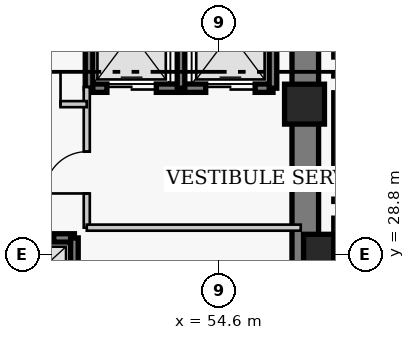
"""IFC4 building model, lengths in metres.
Left out: names, types, materials, properties, quantities, classifications, styles, units other than length and angle.
Written with IfcOpenShell. Run it as: python <this file> out.ifc"""

import sys

from ifc_helpers import new_model, si_unit, direction, frame, frame_2d, origin, origin_2d, place, context, subcontext, project, spatial, rectangle, extrude, element, fill, save


model = new_model("IFC4")
c1 = context("Model", 3, precision=1e-05, world=origin(), true_north=direction((0.0, 1.0)))
c2 = subcontext(c1, "Body", "Model", "MODEL_VIEW")
j1 = project(units=[si_unit("LENGTHUNIT", "METRE"), si_unit("PLANEANGLEUNIT", "RADIAN")], contexts=[c1])
p1 = place(None, origin())
s1 = spatial("IfcSite", under=j1, at=p1, CompositionType="ELEMENT")
p2 = place(p1, origin())
s2 = spatial("IfcBuilding", under=s1, at=p2, CompositionType="ELEMENT")
p3 = place(p2, frame((0.0, 0.0, 176.4)))
s3 = spatial("IfcBuildingStorey", under=s2, at=p3, CompositionType="ELEMENT", Elevation=176.4)
p4 = place(p3, frame((56.87, 27.05, 0.0), z_axis=(0.0, 0.0, 1.0), x_axis=(0.0, 1.0, 0.0)))
e1 = element("IfcWall", 1, at=p4, inside=s3, PredefinedType="SHEAR", context=c2, shape_type="SweptSolid", body=[
    extrude(rectangle(XDim=13.62, YDim=0.7, at=frame_2d((6.81, 0.0))), origin(), (0.0, 0.0, 1.0), 3.8),
])
for number, where, z_axis, x_axis in (
    (2, (57.35, 28.8, 0.0), (0.0, 0.0, 1.0), (1.0, 0.0, 0.0)),
    (3, (56.85, 32.75, 0.0), (0.0, 0.0, 1.0), (1.0, 0.0, 0.0)),
):
    element("IfcColumn", number, at=place(p3, frame(where, z_axis=z_axis, x_axis=x_axis)), inside=s3, PredefinedType="COLUMN", context=c2, shape_type="SweptSolid", body=[
        extrude(rectangle(XDim=1.05, YDim=1.05, at=origin_2d()), origin(), (0.0, 0.0, 1.0), 3.8),
    ])
p5 = place(p3, frame((48.55, 29.23, 0.0), z_axis=(0.0, 0.0, 1.0), x_axis=(1.0, 0.0, 0.0)))
e4 = element("IfcWall", 4, at=p5, inside=s3, PredefinedType="SHEAR", context=c2, shape_type="SweptSolid", body=[
    extrude(rectangle(XDim=2.245, YDim=0.22, at=frame_2d((1.123, 0.0))), origin(), (0.0, 0.0, 1.0), 3.8),
])
p6 = place(p5, frame((0.6, 0.0, 0.0)))
e5 = element("IfcOpeningElement", 5, at=p6, cuts=e4, PredefinedType="OPENING", context=c2, shape_type="SweptSolid", body=[
    extrude(rectangle(XDim=1.1, YDim=2.15, at=frame_2d((0.55, 1.075))), frame((0.0, 0.12, 0.0), z_axis=(0.0, -1.0, 0.0), x_axis=(1.0, 0.0, 0.0)), (0.0, 0.0, 1.0), 0.24),
])
p7 = place(p3, frame((50.795, 27.17, 0.0), z_axis=(0.0, 0.0, 1.0), x_axis=(0.0, 1.0, 0.0)))
e6 = element("IfcWall", 6, at=p7, inside=s3, PredefinedType="SHEAR", context=c2, shape_type="SweptSolid", body=[
    extrude(rectangle(XDim=2.06, YDim=0.2, at=frame_2d((1.03, 0.0))), origin(), (0.0, 0.0, 1.0), 3.8),
])
p8 = place(p3, frame((51.18, 33.17, 0.0), z_axis=(0.0, 0.0, 1.0), x_axis=(1.0, 0.0, 0.0)))
e7 = element("IfcWall", 7, at=p8, inside=s3, PredefinedType="SHEAR", context=c2, shape_type="SweptSolid", body=[
    extrude(rectangle(XDim=2.42, YDim=0.22, at=frame_2d((1.21, 0.0))), origin(), (0.0, 0.0, 1.0), 3.8),
])
p9 = place(p8, frame((0.47, 0.0, 0.0)))
e8 = element("IfcOpeningElement", 8, at=p9, cuts=e7, PredefinedType="OPENING", context=c2, shape_type="SweptSolid", body=[
    extrude(rectangle(XDim=1.3, YDim=2.15, at=frame_2d((0.65, 1.075))), frame((0.0, 0.12, 0.0), z_axis=(0.0, -1.0, 0.0), x_axis=(1.0, 0.0, 0.0)), (0.0, 0.0, 1.0), 0.24),
])
p10 = place(p3, frame((51.18, 33.17, 0.0), z_axis=(0.0, 0.0, 1.0), x_axis=(0.0, 1.0, 0.0)))
e9 = element("IfcWall", 9, at=p10, inside=s3, PredefinedType="SHEAR", context=c2, shape_type="SweptSolid", body=[
    extrude(rectangle(XDim=2.86, YDim=0.2, at=frame_2d((1.43, 0.0))), origin(), (0.0, 0.0, 1.0), 3.8),
])
p11 = place(p3, frame((53.6, 33.17, 0.0), z_axis=(0.0, 0.0, 1.0), x_axis=(1.0, 0.0, 0.0)))
e10 = element("IfcWall", 10, at=p11, inside=s3, PredefinedType="SHEAR", context=c2, shape_type="SweptSolid", body=[
    extrude(rectangle(XDim=2.42, YDim=0.22, at=frame_2d((1.21, 0.0))), origin(), (0.0, 0.0, 1.0), 3.8),
])
p12 = place(p11, frame((0.65, 0.0, 0.0)))
e11 = element("IfcOpeningElement", 11, at=p12, cuts=e10, PredefinedType="OPENING", context=c2, shape_type="SweptSolid", body=[
    extrude(rectangle(XDim=1.3, YDim=2.15, at=frame_2d((0.65, 1.075))), frame((0.0, 0.12, 0.0), z_axis=(0.0, -1.0, 0.0), x_axis=(1.0, 0.0, 0.0)), (0.0, 0.0, 1.0), 0.24),
])
for number, where, z_axis, x_axis in (
    (12, (53.6, 33.17, 0.0), (0.0, 0.0, 1.0), (0.0, 1.0, 0.0)),
    (13, (56.02, 33.17, 0.0), (0.0, 0.0, 1.0), (0.0, 1.0, 0.0)),
):
    element("IfcWall", number, at=place(p3, frame(where, z_axis=z_axis, x_axis=x_axis)), inside=s3, PredefinedType="SHEAR", context=c2, shape_type="SweptSolid", body=[
        extrude(rectangle(XDim=2.86, YDim=0.2, at=frame_2d((1.43, 0.0))), origin(), (0.0, 0.0, 1.0), 3.8),
    ])
p13 = place(p3, frame((51.12, 29.5, 0.0), z_axis=(0.0, 0.0, 1.0), x_axis=(0.0, 1.0, 0.0)))
e14 = element("IfcWall", 14, at=p13, inside=s3, PredefinedType="PARTITIONING", context=c2, shape_type="SweptSolid", body=[
    extrude(rectangle(XDim=3.7, YDim=0.16, at=frame_2d((1.85, 0.0))), origin(), (0.0, 0.0, 1.0), 3.55),
])
p14 = place(p13, frame((0.9, 0.0, 0.0)))
e15 = element("IfcOpeningElement", 15, at=p14, cuts=e14, PredefinedType="OPENING", context=c2, shape_type="SweptSolid", body=[
    extrude(rectangle(XDim=1.1, YDim=2.15, at=frame_2d((0.55, 1.075))), frame((0.0, 0.09, 0.0), z_axis=(0.0, -1.0, 0.0), x_axis=(1.0, 0.0, 0.0)), (0.0, 0.0, 1.0), 0.18),
])
p15 = place(p3, frame((51.12, 29.5, 0.0), z_axis=(0.0, 0.0, 1.0), x_axis=(1.0, 0.0, 0.0)))
e16 = element("IfcWall", 16, at=p15, inside=s3, PredefinedType="PARTITIONING", context=c2, shape_type="SweptSolid", body=[
    extrude(rectangle(XDim=5.63, YDim=0.16, at=frame_2d((2.815, 0.0))), origin(), (0.0, 0.0, 1.0), 3.55),
])
p16 = place(p3, frame((48.92, 32.75, 0.0), z_axis=(0.0, 0.0, 1.0), x_axis=(1.0, 0.0, 0.0)))
e17 = element("IfcWall", 17, at=p16, inside=s3, PredefinedType="PARTITIONING", context=c2, shape_type="SweptSolid", body=[
    extrude(rectangle(XDim=2.2, YDim=0.16, at=frame_2d((1.1, 0.0))), origin(), (0.0, 0.0, 1.0), 3.55),
])
p17 = place(p16, frame((0.65, 0.0, 0.0)))
e18 = element("IfcOpeningElement", 18, at=p17, cuts=e17, PredefinedType="OPENING", context=c2, shape_type="SweptSolid", body=[
    extrude(rectangle(XDim=0.86, YDim=2.05, at=frame_2d((0.43, 1.025))), frame((0.0, 0.09, 0.0), z_axis=(0.0, -1.0, 0.0), x_axis=(1.0, 0.0, 0.0)), (0.0, 0.0, 1.0), 0.18),
])
p18 = place(p6, origin())
e19 = element("IfcDoor", 19, at=p18, inside=s3, OperationType="DOUBLE_DOOR_SLIDING", PredefinedType="DOOR", context=c2, shape_type="SweptSolid", body=[
    extrude(rectangle(XDim=1.1, YDim=2.15, at=frame_2d((0.55, 1.075))), frame((0.0, 0.025, 0.0), z_axis=(0.0, -1.0, 0.0), x_axis=(1.0, 0.0, 0.0)), (0.0, 0.0, 1.0), 0.05),
])
fill(e5, e19)
p19 = place(p9, origin())
e20 = element("IfcDoor", 20, at=p19, inside=s3, OperationType="DOUBLE_DOOR_SLIDING", PredefinedType="DOOR", context=c2, shape_type="SweptSolid", body=[
    extrude(rectangle(XDim=1.3, YDim=2.15, at=frame_2d((0.65, 1.075))), frame((0.0, 0.025, 0.0), z_axis=(0.0, -1.0, 0.0), x_axis=(1.0, 0.0, 0.0)), (0.0, 0.0, 1.0), 0.05),
])
fill(e8, e20)
p20 = place(p12, origin())
e21 = element("IfcDoor", 21, at=p20, inside=s3, OperationType="DOUBLE_DOOR_SLIDING", PredefinedType="DOOR", context=c2, shape_type="SweptSolid", body=[
    extrude(rectangle(XDim=1.3, YDim=2.15, at=frame_2d((0.65, 1.075))), frame((0.0, 0.025, 0.0), z_axis=(0.0, -1.0, 0.0), x_axis=(1.0, 0.0, 0.0)), (0.0, 0.0, 1.0), 0.05),
])
fill(e11, e21)
p21 = place(p14, origin())
e22 = element("IfcDoor", 22, at=p21, inside=s3, OperationType="SINGLE_SWING_LEFT", PredefinedType="DOOR", context=c2, shape_type="SweptSolid", body=[
    extrude(rectangle(XDim=1.1, YDim=2.15, at=frame_2d((0.55, 1.075))), frame((0.0, 0.025, 0.0), z_axis=(0.0, -1.0, 0.0), x_axis=(1.0, 0.0, 0.0)), (0.0, 0.0, 1.0), 0.05),
])
fill(e15, e22)
p22 = place(p17, origin())
e23 = element("IfcDoor", 23, at=p22, inside=s3, OperationType="SINGLE_SWING_RIGHT", PredefinedType="DOOR", context=c2, shape_type="SweptSolid", body=[
    extrude(rectangle(XDim=0.86, YDim=2.05, at=frame_2d((0.43, 1.025))), frame((0.0, 0.025, 0.0), z_axis=(0.0, -1.0, 0.0), x_axis=(1.0, 0.0, 0.0)), (0.0, 0.0, 1.0), 0.05),
])
fill(e18, e23)
save(model, sys.argv[1])
